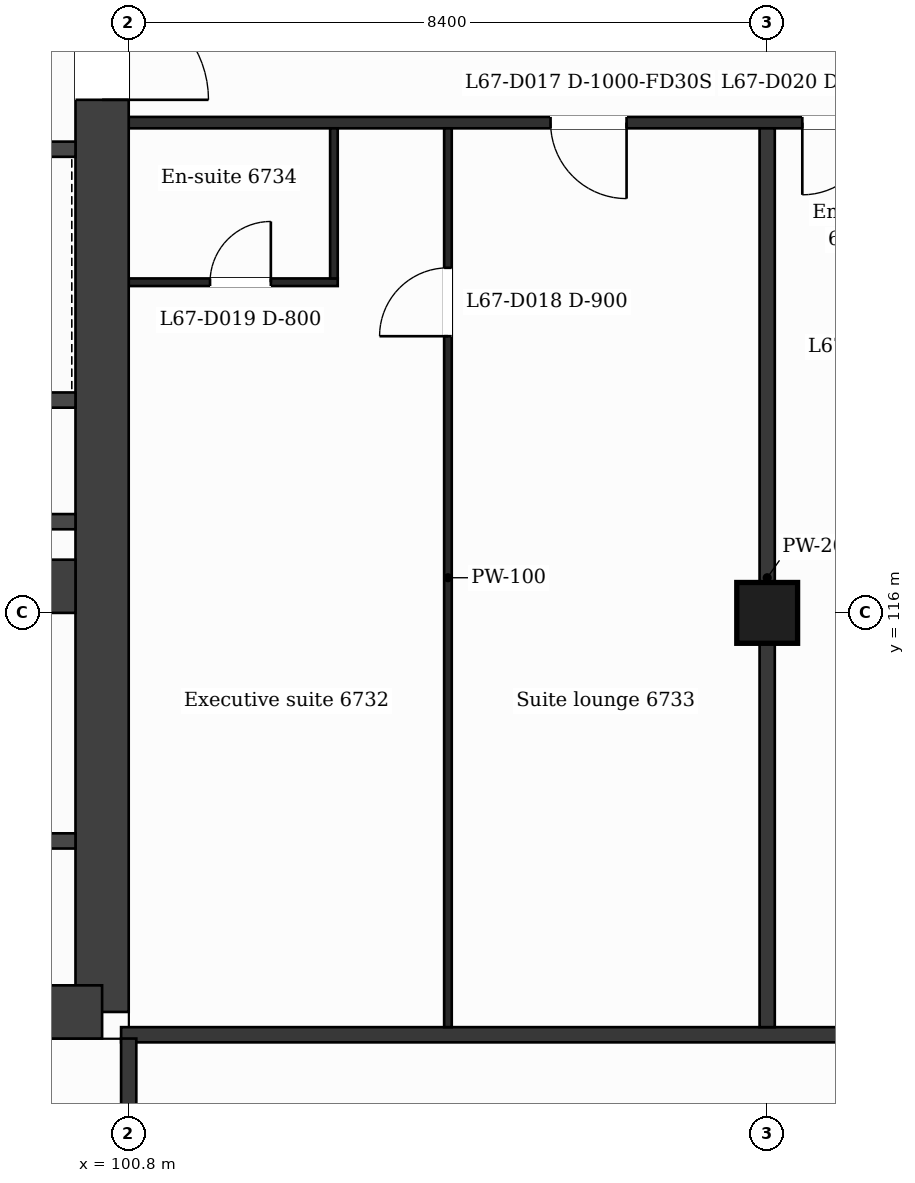
"""IFC4 building model, lengths in metres.
Left out: names, types, materials, properties, quantities, classifications, styles, units other than length and angle.
Written with IfcOpenShell. Run it as: python <this file> out.ifc"""

import sys

from ifc_helpers import new_model, si_unit, direction, frame, frame_2d, origin, origin_2d, place, context, subcontext, project, spatial, rectangle, extrude, element, fill, save


model = new_model("IFC4")
c1 = context("Model", 3, precision=1e-05, world=origin(), true_north=direction((0.0, 1.0)))
c2 = subcontext(c1, "Body", "Model", "MODEL_VIEW")
j1 = project(units=[si_unit("LENGTHUNIT", "METRE"), si_unit("PLANEANGLEUNIT", "RADIAN")], contexts=[c1])
p1 = place(None, origin())
s1 = spatial("IfcSite", under=j1, at=p1, CompositionType="ELEMENT")
p2 = place(p1, origin())
s2 = spatial("IfcBuilding", under=s1, at=p2, CompositionType="ELEMENT")
p3 = place(p2, frame((0.0, 0.0, 277.5)))
s3 = spatial("IfcBuildingStorey", under=s2, at=p3, CompositionType="ELEMENT", Elevation=277.5)
p4 = place(p3, frame((100.45, 132.05, 0.0), z_axis=(0.0, 0.0, 1.0), x_axis=(0.0, -1.0, 0.0)))
e1 = element("IfcWall", 1, at=p4, inside=s3, PredefinedType="SHEAR", context=c2, shape_type="SweptSolid", body=[
    extrude(rectangle(XDim=21.3, YDim=0.7, at=frame_2d((10.65, 0.0))), origin(), (0.0, 0.0, 1.0), 3.7),
])
p5 = place(p4, frame((7.9, 0.0, 0.0)))
e2 = element("IfcOpeningElement", 2, at=p5, cuts=e1, PredefinedType="OPENING", context=c2, shape_type="SweptSolid", body=[
    extrude(rectangle(XDim=1.4, YDim=2.1, at=frame_2d((0.7, 1.05))), frame((0.0, 0.36, 0.0), z_axis=(0.0, -1.0, 0.0), x_axis=(1.0, 0.0, 0.0)), (0.0, 0.0, 1.0), 0.72),
])
p6 = place(p3, frame((100.45, 110.75, 0.0), z_axis=(0.0, 0.0, 1.0), x_axis=(-1.0, 0.0, 0.0)))
e3 = element("IfcWall", 3, at=p6, inside=s3, PredefinedType="SHEAR", context=c2, shape_type="SweptSolid", body=[
    extrude(rectangle(XDim=14.38, YDim=0.7, at=frame_2d((7.19, 0.0))), origin(), (0.0, 0.0, 1.0), 3.7),
])
p7 = place(p6, frame((6.06, 0.0, 0.0)))
e4 = element("IfcOpeningElement", 4, at=p7, cuts=e3, PredefinedType="OPENING", context=c2, shape_type="SweptSolid", body=[
    extrude(rectangle(XDim=1.2, YDim=2.1, at=frame_2d((0.6, 1.05))), frame((0.0, 0.36, 0.0), z_axis=(0.0, -1.0, 0.0), x_axis=(1.0, 0.0, 0.0)), (0.0, 0.0, 1.0), 0.72),
])
p8 = place(p3, frame((94.6, 116.35, 0.0), z_axis=(0.0, 0.0, 1.0), x_axis=(1.0, 0.0, 0.0)))
e5 = element("IfcWall", 5, at=p8, inside=s3, PredefinedType="SHEAR", context=c2, shape_type="SweptSolid", body=[
    extrude(rectangle(XDim=5.5, YDim=0.7, at=frame_2d((2.75, 0.0))), origin(), (0.0, 0.0, 1.0), 3.7),
])
p9 = place(p3, frame((109.2, 116.0, 0.0), z_axis=(0.0, 0.0, 1.0), x_axis=(1.0, 0.0, 0.0)))
e6 = element("IfcColumn", 6, at=p9, inside=s3, PredefinedType="COLUMN", context=c2, shape_type="SweptSolid", body=[
    extrude(rectangle(XDim=0.8, YDim=0.8, at=origin_2d()), origin(), (0.0, 0.0, 1.0), 3.7),
])
p10 = place(p3, frame((100.7, 110.45, 0.0), z_axis=(0.0, 0.0, 1.0), x_axis=(1.0, 0.0, 0.0)))
e7 = element("IfcWall", 7, at=p10, inside=s3, PredefinedType="PARTITIONING", context=c2, shape_type="SweptSolid", body=[
    extrude(rectangle(XDim=25.4, YDim=0.2, at=frame_2d((12.7, 0.0))), origin(), (0.0, 0.0, 1.0), 3.38),
])
p11 = place(p3, frame((95.127, 113.0, 0.0), z_axis=(0.0, 0.0, 1.0), x_axis=(1.0, 0.0, 0.0)))
e8 = element("IfcWall", 8, at=p11, inside=s3, PredefinedType="PARTITIONING", context=c2, shape_type="SweptSolid", body=[
    extrude(rectangle(XDim=4.973, YDim=0.2, at=frame_2d((2.487, 0.0))), origin(), (0.0, 0.0, 1.0), 3.38),
])
p12 = place(p11, frame((3.096, 0.0, 0.0)))
e9 = element("IfcOpeningElement", 9, at=p12, cuts=e8, PredefinedType="OPENING", context=c2, shape_type="SweptSolid", body=[
    extrude(rectangle(XDim=0.9, YDim=2.1, at=frame_2d((0.45, 1.05))), frame((0.0, 0.11, 0.0), z_axis=(0.0, -1.0, 0.0), x_axis=(1.0, 0.0, 0.0)), (0.0, 0.0, 1.0), 0.22),
])
for number, where, z_axis, x_axis in (
    (10, (95.227, 117.2, 0.0), (0.0, 0.0, 1.0), (1.0, 0.0, 0.0)),
    (11, (95.227, 118.8, 0.0), (0.0, 0.0, 1.0), (1.0, 0.0, 0.0)),
):
    element("IfcWall", number, at=place(p3, frame(where, z_axis=z_axis, x_axis=x_axis)), inside=s3, PredefinedType="PARTITIONING", context=c2, shape_type="SweptSolid", body=[
        extrude(rectangle(XDim=4.873, YDim=0.2, at=frame_2d((2.437, 0.0))), origin(), (0.0, 0.0, 1.0), 3.38),
    ])
p13 = place(p3, frame((100.8, 120.35, 0.0), z_axis=(0.0, 0.0, 1.0), x_axis=(1.0, 0.0, 0.0)))
e12 = element("IfcWall", 12, at=p13, inside=s3, PredefinedType="PARTITIONING", context=c2, shape_type="SweptSolid", body=[
    extrude(rectangle(XDim=2.75, YDim=0.1, at=frame_2d((1.375, 0.0))), origin(), (0.0, 0.0, 1.0), 3.38),
])
p14 = place(p13, frame((1.07, 0.0, 0.0)))
e13 = element("IfcOpeningElement", 13, at=p14, cuts=e12, PredefinedType="OPENING", context=c2, shape_type="SweptSolid", body=[
    extrude(rectangle(XDim=0.8, YDim=2.1, at=frame_2d((0.4, 1.05))), frame((0.0, 0.06, 0.0), z_axis=(0.0, -1.0, 0.0), x_axis=(1.0, 0.0, 0.0)), (0.0, 0.0, 1.0), 0.12),
])
p15 = place(p3, frame((95.227, 122.1, 0.0), z_axis=(0.0, 0.0, 1.0), x_axis=(1.0, 0.0, 0.0)))
e14 = element("IfcWall", 14, at=p15, inside=s3, PredefinedType="PARTITIONING", context=c2, shape_type="SweptSolid", body=[
    extrude(rectangle(XDim=4.873, YDim=0.2, at=frame_2d((2.437, 0.0))), origin(), (0.0, 0.0, 1.0), 3.38),
])
p16 = place(p15, frame((0.605, 0.0, 0.0)))
e15 = element("IfcOpeningElement", 15, at=p16, cuts=e14, PredefinedType="OPENING", context=c2, shape_type="SweptSolid", body=[
    extrude(rectangle(XDim=1.1, YDim=2.1, at=frame_2d((0.55, 1.05))), frame((0.0, 0.11, 0.0), z_axis=(0.0, -1.0, 0.0), x_axis=(1.0, 0.0, 0.0)), (0.0, 0.0, 1.0), 0.22),
])
p17 = place(p15, frame((2.946, 0.0, 0.0)))
e16 = element("IfcOpeningElement", 16, at=p17, cuts=e14, PredefinedType="OPENING", context=c2, shape_type="SweptSolid", body=[
    extrude(rectangle(XDim=1.1, YDim=2.1, at=frame_2d((0.55, 1.05))), frame((0.0, 0.11, 0.0), z_axis=(0.0, -1.0, 0.0), x_axis=(1.0, 0.0, 0.0)), (0.0, 0.0, 1.0), 0.22),
])
p18 = place(p3, frame((100.8, 122.45, 0.0), z_axis=(0.0, 0.0, 1.0), x_axis=(1.0, 0.0, 0.0)))
e17 = element("IfcWall", 17, at=p18, inside=s3, PredefinedType="PARTITIONING", context=c2, shape_type="SweptSolid", body=[
    extrude(rectangle(XDim=25.2, YDim=0.15, at=frame_2d((12.6, 0.0))), origin(), (0.0, 0.0, 1.0), 3.38),
])
p19 = place(p18, frame((5.55, 0.0, 0.0)))
e18 = element("IfcOpeningElement", 18, at=p19, cuts=e17, PredefinedType="OPENING", context=c2, shape_type="SweptSolid", body=[
    extrude(rectangle(XDim=1.0, YDim=2.1, at=frame_2d((0.5, 1.05))), frame((0.0, 0.085, 0.0), z_axis=(0.0, -1.0, 0.0), x_axis=(1.0, 0.0, 0.0)), (0.0, 0.0, 1.0), 0.17),
])
p20 = place(p18, frame((8.862, 0.0, 0.0)))
e19 = element("IfcOpeningElement", 19, at=p20, cuts=e17, PredefinedType="OPENING", context=c2, shape_type="SweptSolid", body=[
    extrude(rectangle(XDim=0.95, YDim=2.1, at=frame_2d((0.475, 1.05))), frame((0.0, 0.085, 0.0), z_axis=(0.0, -1.0, 0.0), x_axis=(1.0, 0.0, 0.0)), (0.0, 0.0, 1.0), 0.17),
])
p21 = place(p18, frame((15.2, 0.0, 0.0)))
e20 = element("IfcOpeningElement", 20, at=p21, cuts=e17, PredefinedType="OPENING", context=c2, shape_type="SweptSolid", body=[
    extrude(rectangle(XDim=0.95, YDim=2.1, at=frame_2d((0.475, 1.05))), frame((0.0, 0.085, 0.0), z_axis=(0.0, -1.0, 0.0), x_axis=(1.0, 0.0, 0.0)), (0.0, 0.0, 1.0), 0.17),
])
p22 = place(p18, frame((17.325, 0.0, 0.0)))
e21 = element("IfcOpeningElement", 21, at=p22, cuts=e17, PredefinedType="OPENING", context=c2, shape_type="SweptSolid", body=[
    extrude(rectangle(XDim=1.0, YDim=2.1, at=frame_2d((0.5, 1.05))), frame((0.0, 0.085, 0.0), z_axis=(0.0, -1.0, 0.0), x_axis=(1.0, 0.0, 0.0)), (0.0, 0.0, 1.0), 0.17),
])
p23 = place(p18, frame((23.862, 0.0, 0.0)))
e22 = element("IfcOpeningElement", 22, at=p23, cuts=e17, PredefinedType="OPENING", context=c2, shape_type="SweptSolid", body=[
    extrude(rectangle(XDim=0.95, YDim=2.1, at=frame_2d((0.475, 1.05))), frame((0.0, 0.085, 0.0), z_axis=(0.0, -1.0, 0.0), x_axis=(1.0, 0.0, 0.0)), (0.0, 0.0, 1.0), 0.17),
])
p24 = place(p3, frame((100.8, 108.79, 0.0), z_axis=(0.0, 0.0, 1.0), x_axis=(0.0, 1.0, 0.0)))
e23 = element("IfcWall", 23, at=p24, inside=s3, PredefinedType="PARTITIONING", context=c2, shape_type="SweptSolid", body=[
    extrude(rectangle(XDim=1.61, YDim=0.2, at=frame_2d((0.805, 0.0))), origin(), (0.0, 0.0, 1.0), 3.38),
])
p25 = place(p3, frame((103.5, 120.4, 0.0), z_axis=(0.0, 0.0, 1.0), x_axis=(0.0, 1.0, 0.0)))
e24 = element("IfcWall", 24, at=p25, inside=s3, PredefinedType="PARTITIONING", context=c2, shape_type="SweptSolid", body=[
    extrude(rectangle(XDim=1.975, YDim=0.1, at=frame_2d((0.988, 0.0))), origin(), (0.0, 0.0, 1.0), 3.38),
])
p26 = place(p3, frame((105.0, 110.55, 0.0), z_axis=(0.0, 0.0, 1.0), x_axis=(0.0, 1.0, 0.0)))
e25 = element("IfcWall", 25, at=p26, inside=s3, PredefinedType="PARTITIONING", context=c2, shape_type="SweptSolid", body=[
    extrude(rectangle(XDim=11.825, YDim=0.1, at=frame_2d((5.913, 0.0))), origin(), (0.0, 0.0, 1.0), 3.38),
])
p27 = place(p26, frame((9.09, 0.0, 0.0)))
e26 = element("IfcOpeningElement", 26, at=p27, cuts=e25, PredefinedType="OPENING", context=c2, shape_type="SweptSolid", body=[
    extrude(rectangle(XDim=0.9, YDim=2.1, at=frame_2d((0.45, 1.05))), frame((0.0, 0.06, 0.0), z_axis=(0.0, -1.0, 0.0), x_axis=(1.0, 0.0, 0.0)), (0.0, 0.0, 1.0), 0.12),
])
p28 = place(p3, frame((109.2, 110.55, 0.0), z_axis=(0.0, 0.0, 1.0), x_axis=(0.0, 1.0, 0.0)))
e27 = element("IfcWall", 27, at=p28, inside=s3, PredefinedType="PARTITIONING", context=c2, shape_type="SweptSolid", body=[
    extrude(rectangle(XDim=11.825, YDim=0.2, at=frame_2d((5.913, 0.0))), origin(), (0.0, 0.0, 1.0), 3.38),
])
p29 = place(p19, origin())
e28 = element("IfcDoor", 28, at=p29, inside=s3, OperationType="SINGLE_SWING_RIGHT", PredefinedType="DOOR", context=c2, shape_type="SweptSolid", body=[
    extrude(rectangle(XDim=1.0, YDim=2.1, at=frame_2d((0.5, 1.05))), frame((0.0, 0.025, 0.0), z_axis=(0.0, -1.0, 0.0), x_axis=(1.0, 0.0, 0.0)), (0.0, 0.0, 1.0), 0.05),
])
fill(e18, e28)
p30 = place(p27, origin())
e29 = element("IfcDoor", 29, at=p30, inside=s3, OperationType="SINGLE_SWING_LEFT", PredefinedType="DOOR", context=c2, shape_type="SweptSolid", body=[
    extrude(rectangle(XDim=0.9, YDim=2.1, at=frame_2d((0.45, 1.05))), frame((0.0, 0.025, 0.0), z_axis=(0.0, -1.0, 0.0), x_axis=(1.0, 0.0, 0.0)), (0.0, 0.0, 1.0), 0.05),
])
fill(e26, e29)
p31 = place(p14, origin())
e30 = element("IfcDoor", 30, at=p31, inside=s3, OperationType="SINGLE_SWING_RIGHT", PredefinedType="DOOR", context=c2, shape_type="SweptSolid", body=[
    extrude(rectangle(XDim=0.8, YDim=2.1, at=frame_2d((0.4, 1.05))), frame((0.0, 0.025, 0.0), z_axis=(0.0, -1.0, 0.0), x_axis=(1.0, 0.0, 0.0)), (0.0, 0.0, 1.0), 0.05),
])
fill(e13, e30)
p32 = place(p20, origin())
e31 = element("IfcDoor", 31, at=p32, inside=s3, OperationType="SINGLE_SWING_LEFT", PredefinedType="DOOR", context=c2, shape_type="SweptSolid", body=[
    extrude(rectangle(XDim=0.95, YDim=2.1, at=frame_2d((0.475, 1.05))), frame((0.0, 0.025, 0.0), z_axis=(0.0, -1.0, 0.0), x_axis=(1.0, 0.0, 0.0)), (0.0, 0.0, 1.0), 0.05),
])
fill(e19, e31)
p33 = place(p5, origin())
e32 = element("IfcDoor", 32, at=p33, inside=s3, OperationType="SINGLE_SWING_RIGHT", PredefinedType="DOOR", context=c2, shape_type="SweptSolid", body=[
    extrude(rectangle(XDim=1.4, YDim=2.1, at=frame_2d((0.7, 1.05))), frame((0.0, 0.025, 0.0), z_axis=(0.0, -1.0, 0.0), x_axis=(1.0, 0.0, 0.0)), (0.0, 0.0, 1.0), 0.05),
])
fill(e2, e32)
save(model, sys.argv[1])
